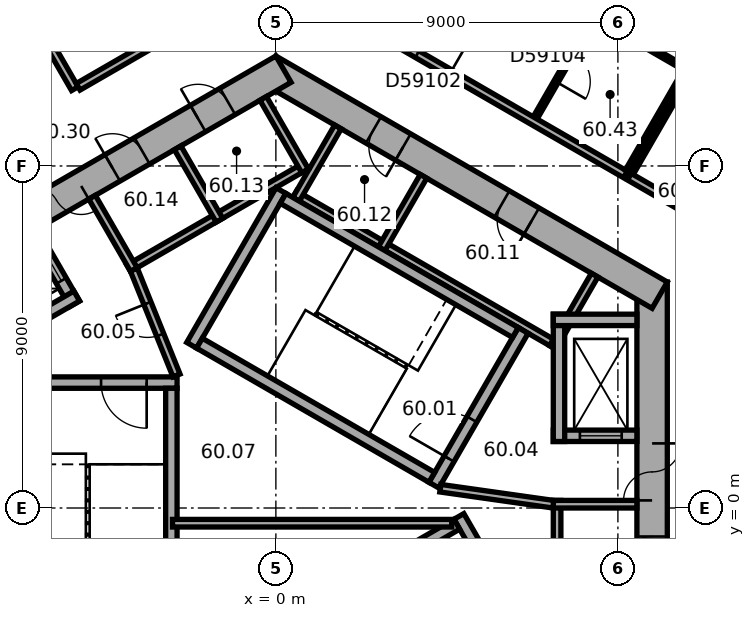
"""IFC4 building model, lengths in metres.
Left out: names, types, materials, properties, quantities, classifications, styles, units other than length and angle.
Written with IfcOpenShell. Run it as: python <this file> out.ifc"""

import sys

from ifc_helpers import new_model, si_unit, direction, frame, frame_2d, origin, place, context, subcontext, project, spatial, rectangle, extrude, element, fill, save


model = new_model("IFC4")
c1 = context("Model", 3, precision=1e-05, world=origin(), true_north=direction((0.0, 1.0)))
c2 = subcontext(c1, "Body", "Model", "MODEL_VIEW")
j1 = project(units=[si_unit("LENGTHUNIT", "METRE"), si_unit("PLANEANGLEUNIT", "RADIAN")], contexts=[c1])
p1 = place(None, origin())
s1 = spatial("IfcSite", under=j1, at=p1, CompositionType="ELEMENT")
p2 = place(p1, origin())
s2 = spatial("IfcBuilding", under=s1, at=p2, CompositionType="ELEMENT")
p3 = place(p2, frame((0.0, 0.0, 243.9)))
s3 = spatial("IfcBuildingStorey", under=s2, at=p3, CompositionType="ELEMENT", Elevation=243.9)
p4 = place(p3, frame((9.9, -5.947, 0.0), z_axis=(0.0, 0.0, 1.0), x_axis=(0.0, 1.0, 0.0)))
e1 = element("IfcWall", 1, at=p4, inside=s3, PredefinedType="SHEAR", context=c2, shape_type="SweptSolid", body=[
    extrude(rectangle(XDim=11.894, YDim=0.8, at=frame_2d((5.947, 0.0))), origin(), (0.0, 0.0, 1.0), 3.7),
])
p5 = place(p4, frame((6.147, 0.0, 0.0)))
e2 = element("IfcOpeningElement", 2, at=p5, cuts=e1, PredefinedType="OPENING", context=c2, shape_type="SweptSolid", body=[
    extrude(rectangle(XDim=1.5, YDim=2.1, at=frame_2d((0.75, 1.05))), frame((0.0, 0.41, 0.0), z_axis=(0.0, -1.0, 0.0), x_axis=(1.0, 0.0, 0.0)), (0.0, 0.0, 1.0), 0.82),
])
p6 = place(p4, frame((1.697, 0.0, 0.0)))
e3 = element("IfcOpeningElement", 3, at=p6, cuts=e1, PredefinedType="OPENING", context=c2, shape_type="SweptSolid", body=[
    extrude(rectangle(XDim=0.9, YDim=2.1, at=frame_2d((0.45, 1.05))), frame((0.0, 0.41, 0.0), z_axis=(0.0, -1.0, 0.0), x_axis=(1.0, 0.0, 0.0)), (0.0, 0.0, 1.0), 0.82),
])
p7 = place(p4, frame((4.297, 0.0, 0.0)))
e4 = element("IfcOpeningElement", 4, at=p7, cuts=e1, PredefinedType="OPENING", context=c2, shape_type="SweptSolid", body=[
    extrude(rectangle(XDim=0.9, YDim=2.1, at=frame_2d((0.45, 1.05))), frame((0.0, 0.41, 0.0), z_axis=(0.0, -1.0, 0.0), x_axis=(1.0, 0.0, 0.0)), (0.0, 0.0, 1.0), 0.82),
])
p8 = place(p3, frame((10.1, 5.6, 0.0), z_axis=(0.0, 0.0, 1.0), x_axis=(-0.866023897231, 0.500002609418, 0.0)))
e5 = element("IfcWall", 5, at=p8, inside=s3, PredefinedType="SHEAR", context=c2, shape_type="SweptSolid", body=[
    extrude(rectangle(XDim=11.894, YDim=0.8, at=frame_2d((5.947, 0.0))), origin(), (0.0, 0.0, 1.0), 3.7),
])
p9 = place(p8, frame((3.897, 0.0, 0.0)))
e6 = element("IfcOpeningElement", 6, at=p9, cuts=e5, PredefinedType="OPENING", context=c2, shape_type="SweptSolid", body=[
    extrude(rectangle(XDim=0.9, YDim=2.1, at=frame_2d((0.45, 1.05))), frame((0.0, 0.41, 0.0), z_axis=(0.0, -1.0, 0.0), x_axis=(1.0, 0.0, 0.0)), (0.0, 0.0, 1.0), 0.82),
])
p10 = place(p8, frame((7.797, 0.0, 0.0)))
e7 = element("IfcOpeningElement", 7, at=p10, cuts=e5, PredefinedType="OPENING", context=c2, shape_type="SweptSolid", body=[
    extrude(rectangle(XDim=0.9, YDim=2.1, at=frame_2d((0.45, 1.05))), frame((0.0, 0.41, 0.0), z_axis=(0.0, -1.0, 0.0), x_axis=(1.0, 0.0, 0.0)), (0.0, 0.0, 1.0), 0.82),
])
p11 = place(p3, frame((0.2, 11.547, 0.0), z_axis=(0.0, 0.0, 1.0), x_axis=(-0.866023897231, -0.500002609418, 0.0)))
e8 = element("IfcWall", 8, at=p11, inside=s3, PredefinedType="SHEAR", context=c2, shape_type="SweptSolid", body=[
    extrude(rectangle(XDim=11.894, YDim=0.8, at=frame_2d((5.947, 0.0))), origin(), (0.0, 0.0, 1.0), 3.7),
])
p12 = place(p11, frame((6.147, 0.0, 0.0)))
e9 = element("IfcOpeningElement", 9, at=p12, cuts=e8, PredefinedType="OPENING", context=c2, shape_type="SweptSolid", body=[
    extrude(rectangle(XDim=1.5, YDim=2.1, at=frame_2d((0.75, 1.05))), frame((0.0, 0.41, 0.0), z_axis=(0.0, -1.0, 0.0), x_axis=(1.0, 0.0, 0.0)), (0.0, 0.0, 1.0), 0.82),
])
p13 = place(p11, frame((1.697, 0.0, 0.0)))
e10 = element("IfcOpeningElement", 10, at=p13, cuts=e8, PredefinedType="OPENING", context=c2, shape_type="SweptSolid", body=[
    extrude(rectangle(XDim=0.9, YDim=2.1, at=frame_2d((0.45, 1.05))), frame((0.0, 0.41, 0.0), z_axis=(0.0, -1.0, 0.0), x_axis=(1.0, 0.0, 0.0)), (0.0, 0.0, 1.0), 0.82),
])
p14 = place(p11, frame((4.297, 0.0, 0.0)))
e11 = element("IfcOpeningElement", 11, at=p14, cuts=e8, PredefinedType="OPENING", context=c2, shape_type="SweptSolid", body=[
    extrude(rectangle(XDim=0.9, YDim=2.1, at=frame_2d((0.45, 1.05))), frame((0.0, 0.41, 0.0), z_axis=(0.0, -1.0, 0.0), x_axis=(1.0, 0.0, 0.0)), (0.0, 0.0, 1.0), 0.82),
])
p15 = place(p3, frame((7.4, -5.2, 0.0), z_axis=(0.0, 0.0, 1.0), x_axis=(0.0, 1.0, 0.0)))
e12 = element("IfcWall", 12, at=p15, inside=s3, PredefinedType="PARTITIONING", context=c2, shape_type="SweptSolid", body=[
    extrude(rectangle(XDim=5.4, YDim=0.2, at=frame_2d((2.7, 0.0))), origin(), (0.0, 0.0, 1.0), 3.42),
])
p16 = place(p3, frame((7.3, 0.1, 0.0), z_axis=(0.0, 0.0, 1.0), x_axis=(1.0, 0.0, 0.0)))
e13 = element("IfcWall", 13, at=p16, inside=s3, PredefinedType="PARTITIONING", context=c2, shape_type="SweptSolid", body=[
    extrude(rectangle(XDim=2.2, YDim=0.2, at=frame_2d((1.1, 0.0))), origin(), (0.0, 0.0, 1.0), 3.42),
])
p17 = place(p3, frame((7.424, 4.259, 0.0), z_axis=(0.0, 0.0, 1.0), x_axis=(-0.866026010844, 0.49999894854, 0.0)))
e14 = element("IfcWall", 14, at=p17, inside=s3, PredefinedType="PARTITIONING", context=c2, shape_type="SweptSolid", body=[
    extrude(rectangle(XDim=8.0, YDim=0.2, at=frame_2d((4.0, 0.0))), origin(), (0.0, 0.0, 1.0), 3.42),
])
for number, where, z_axis, x_axis in (
    (15, (7.287, 4.222, 0.0), (0.0, 0.0, 1.0), (0.5, 0.866, 0.0)),
    (16, (2.784, 6.822, 0.0), (0.0, 0.0, 1.0), (0.5, 0.866, 0.0)),
    (17, (0.532, 8.122, 0.0), (0.0, 0.0, 1.0), (0.5, 0.866, 0.0)),
):
    element("IfcWall", number, at=place(p3, frame(where, z_axis=z_axis, x_axis=x_axis)), inside=s3, PredefinedType="PARTITIONING", context=c2, shape_type="SweptSolid", body=[
        extrude(rectangle(XDim=2.2, YDim=0.2, at=frame_2d((1.1, 0.0))), origin(), (0.0, 0.0, 1.0), 3.42),
    ])
p18 = place(p3, frame((0.803, 9.009, 0.0), z_axis=(0.0, 0.0, 1.0), x_axis=(-0.866028230842, -0.499995103361, 0.0)))
e18 = element("IfcWall", 18, at=p18, inside=s3, PredefinedType="PARTITIONING", context=c2, shape_type="SweptSolid", body=[
    extrude(rectangle(XDim=5.4, YDim=0.2, at=frame_2d((2.7, 0.0))), origin(), (0.0, 0.0, 1.0), 3.42),
])
p19 = place(p3, frame((0.767, 8.872, 0.0), z_axis=(0.0, 0.0, 1.0), x_axis=(-0.499994660107, 0.866028486751, 0.0)))
e19 = element("IfcWall", 19, at=p19, inside=s3, PredefinedType="PARTITIONING", context=c2, shape_type="SweptSolid", body=[
    extrude(rectangle(XDim=2.2, YDim=0.2, at=frame_2d((1.1, 0.0))), origin(), (0.0, 0.0, 1.0), 3.42),
])
for number, where, z_axis, x_axis in (
    (20, (-1.485, 7.572, 0.0), (0.0, 0.0, 1.0), (-0.5, 0.866, 0.0)),
    (21, (-3.737, 6.272, 0.0), (0.0, 0.0, 1.0), (-0.5, 0.866, 0.0)),
):
    element("IfcWall", number, at=place(p3, frame(where, z_axis=z_axis, x_axis=x_axis)), inside=s3, PredefinedType="PARTITIONING", context=c2, shape_type="SweptSolid", body=[
        extrude(rectangle(XDim=2.2, YDim=0.2, at=frame_2d((1.1, 0.0))), origin(), (0.0, 0.0, 1.0), 3.42),
    ])
p20 = place(p3, frame((4.158, 0.602, 0.0), z_axis=(0.0, 0.0, 1.0), x_axis=(0.499977259774, 0.866038532462, 0.0)))
e22 = element("IfcWall", 22, at=p20, inside=s3, PredefinedType="SHEAR", context=c2, shape_type="SweptSolid", body=[
    extrude(rectangle(XDim=4.7, YDim=0.3, at=frame_2d((2.35, 0.0))), origin(), (0.0, 0.0, 1.0), 3.42),
])
p21 = place(p20, frame((0.8, 0.0, 0.0)))
e23 = element("IfcOpeningElement", 23, at=p21, cuts=e22, PredefinedType="OPENING", context=c2, shape_type="SweptSolid", body=[
    extrude(rectangle(XDim=1.2, YDim=2.1, at=frame_2d((0.6, 1.05))), frame((0.0, 0.16, 0.0), z_axis=(0.0, -1.0, 0.0), x_axis=(1.0, 0.0, 0.0)), (0.0, 0.0, 1.0), 0.32),
])
p22 = place(p3, frame((-2.216, 4.282, 0.0), z_axis=(0.0, 0.0, 1.0), x_axis=(0.499977259774, 0.866038532462, 0.0)))
e24 = element("IfcWall", 24, at=p22, inside=s3, PredefinedType="SHEAR", context=c2, shape_type="SweptSolid", body=[
    extrude(rectangle(XDim=4.7, YDim=0.3, at=frame_2d((2.35, 0.0))), origin(), (0.0, 0.0, 1.0), 3.42),
])
for number, where, z_axis, x_axis in (
    (25, (4.103, 0.807, 0.0), (0.0, 0.0, 1.0), (-0.866, 0.5, 0.0)),
    (26, (6.303, 4.617, 0.0), (0.0, 0.0, 1.0), (-0.866, 0.5, 0.0)),
):
    element("IfcWall", number, at=place(p3, frame(where, z_axis=z_axis, x_axis=x_axis)), inside=s3, PredefinedType="SHEAR", context=c2, shape_type="SweptSolid", body=[
        extrude(rectangle(XDim=7.06, YDim=0.3, at=frame_2d((3.53, 0.0))), origin(), (0.0, 0.0, 1.0), 3.42),
    ])
p23 = place(p3, frame((-2.6, 3.3, 0.0), z_axis=(0.0, 0.0, 1.0), x_axis=(-1.0, 0.0, 0.0)))
e27 = element("IfcWall", 27, at=p23, inside=s3, PredefinedType="SHEAR", context=c2, shape_type="SweptSolid", body=[
    extrude(rectangle(XDim=4.7, YDim=0.3, at=frame_2d((2.35, 0.0))), origin(), (0.0, 0.0, 1.0), 3.42),
])
p24 = place(p23, frame((0.8, 0.0, 0.0)))
e28 = element("IfcOpeningElement", 28, at=p24, cuts=e27, PredefinedType="OPENING", context=c2, shape_type="SweptSolid", body=[
    extrude(rectangle(XDim=1.2, YDim=2.1, at=frame_2d((0.6, 1.05))), frame((0.0, 0.16, 0.0), z_axis=(0.0, -1.0, 0.0), x_axis=(1.0, 0.0, 0.0)), (0.0, 0.0, 1.0), 0.32),
])
p25 = place(p3, frame((-2.75, 3.15, 0.0), z_axis=(0.0, 0.0, 1.0), x_axis=(0.0, -1.0, 0.0)))
e29 = element("IfcWall", 29, at=p25, inside=s3, PredefinedType="SHEAR", context=c2, shape_type="SweptSolid", body=[
    extrude(rectangle(XDim=7.06, YDim=0.3, at=frame_2d((3.53, 0.0))), origin(), (0.0, 0.0, 1.0), 3.42),
])
p26 = place(p3, frame((4.816, -0.222, 0.0), z_axis=(0.0, 0.0, 1.0), x_axis=(0.499977259774, -0.866038532462, 0.0)))
e30 = element("IfcWall", 30, at=p26, inside=s3, PredefinedType="SHEAR", context=c2, shape_type="SweptSolid", body=[
    extrude(rectangle(XDim=4.7, YDim=0.3, at=frame_2d((2.35, 0.0))), origin(), (0.0, 0.0, 1.0), 3.42),
])
p27 = place(p3, frame((-1.353, -3.957, 0.0), z_axis=(0.0, 0.0, 1.0), x_axis=(0.866027801685, 0.499995846692, 0.0)))
e31 = element("IfcWall", 31, at=p27, inside=s3, PredefinedType="SHEAR", context=c2, shape_type="SweptSolid", body=[
    extrude(rectangle(XDim=7.06, YDim=0.3, at=frame_2d((3.53, 0.0))), origin(), (0.0, 0.0, 1.0), 3.42),
])
p28 = place(p3, frame((7.3, 1.9, 0.0), z_axis=(0.0, 0.0, 1.0), x_axis=(1.0, 0.0, 0.0)))
e32 = element("IfcWall", 32, at=p28, inside=s3, PredefinedType="SHEAR", context=c2, shape_type="SweptSolid", body=[
    extrude(rectangle(XDim=2.2, YDim=0.3, at=frame_2d((1.1, 0.0))), origin(), (0.0, 0.0, 1.0), 3.42),
])
p29 = place(p28, frame((0.7, 0.0, 0.0)))
e33 = element("IfcOpeningElement", 33, at=p29, cuts=e32, PredefinedType="OPENING", context=c2, shape_type="SweptSolid", body=[
    extrude(rectangle(XDim=1.1, YDim=2.1, at=frame_2d((0.55, 1.05))), frame((0.0, 0.16, 0.0), z_axis=(0.0, -1.0, 0.0), x_axis=(1.0, 0.0, 0.0)), (0.0, 0.0, 1.0), 0.32),
])
p30 = place(p3, frame((7.45, 1.75, 0.0), z_axis=(0.0, 0.0, 1.0), x_axis=(0.0, 1.0, 0.0)))
e34 = element("IfcWall", 34, at=p30, inside=s3, PredefinedType="SHEAR", context=c2, shape_type="SweptSolid", body=[
    extrude(rectangle(XDim=3.35, YDim=0.3, at=frame_2d((1.675, 0.0))), origin(), (0.0, 0.0, 1.0), 3.42),
])
p31 = place(p3, frame((7.3, 4.95, 0.0), z_axis=(0.0, 0.0, 1.0), x_axis=(1.0, 0.0, 0.0)))
e35 = element("IfcWall", 35, at=p31, inside=s3, PredefinedType="SHEAR", context=c2, shape_type="SweptSolid", body=[
    extrude(rectangle(XDim=2.2, YDim=0.3, at=frame_2d((1.1, 0.0))), origin(), (0.0, 0.0, 1.0), 3.42),
])
p32 = place(p3, frame((4.327, 0.521, 0.0), z_axis=(0.0, 0.0, 1.0), x_axis=(0.990124376366, -0.14019172346, 0.0)))
e36 = element("IfcWall", 36, at=p32, inside=s3, PredefinedType="PARTITIONING", context=c2, shape_type="SweptSolid", body=[
    extrude(rectangle(XDim=3.002, YDim=0.2, at=frame_2d((1.501, 0.0))), origin(), (0.0, 0.0, 1.0), 3.42),
])
p33 = place(p3, frame((-5.295, 5.372, 0.0), z_axis=(0.0, 0.0, 1.0), x_axis=(-0.500077893725, 0.86598042715, 0.0)))
e37 = element("IfcWall", 37, at=p33, inside=s3, PredefinedType="SHEAR", context=c2, shape_type="SweptSolid", body=[
    extrude(rectangle(XDim=2.2, YDim=0.3, at=frame_2d((1.1, 0.0))), origin(), (0.0, 0.0, 1.0), 3.42),
])
p34 = place(p33, frame((0.7, 0.0, 0.0)))
e38 = element("IfcOpeningElement", 38, at=p34, cuts=e37, PredefinedType="OPENING", context=c2, shape_type="SweptSolid", body=[
    extrude(rectangle(XDim=1.1, YDim=2.1, at=frame_2d((0.55, 1.05))), frame((0.0, 0.16, 0.0), z_axis=(0.0, -1.0, 0.0), x_axis=(1.0, 0.0, 0.0)), (0.0, 0.0, 1.0), 0.32),
])
p35 = place(p3, frame((-5.24, 5.577, 0.0), z_axis=(0.0, 0.0, 1.0), x_axis=(-0.866014461049, -0.500018952895, 0.0)))
e39 = element("IfcWall", 39, at=p35, inside=s3, PredefinedType="SHEAR", context=c2, shape_type="SweptSolid", body=[
    extrude(rectangle(XDim=3.35, YDim=0.3, at=frame_2d((1.675, 0.0))), origin(), (0.0, 0.0, 1.0), 3.42),
])
p36 = place(p3, frame((-2.615, 3.487, 0.0), z_axis=(0.0, 0.0, 1.0), x_axis=(-0.373576831041, 0.92759924068, 0.0)))
e40 = element("IfcWall", 40, at=p36, inside=s3, PredefinedType="PARTITIONING", context=c2, shape_type="SweptSolid", body=[
    extrude(rectangle(XDim=3.002, YDim=0.2, at=frame_2d((1.501, 0.0))), origin(), (0.0, 0.0, 1.0), 3.42),
])
p37 = place(p36, frame((1.15, 0.0, 0.0)))
e41 = element("IfcOpeningElement", 41, at=p37, cuts=e40, PredefinedType="OPENING", context=c2, shape_type="SweptSolid", body=[
    extrude(rectangle(XDim=0.9, YDim=2.1, at=frame_2d((0.45, 1.05))), frame((0.0, 0.11, 0.0), z_axis=(0.0, -1.0, 0.0), x_axis=(1.0, 0.0, 0.0)), (0.0, 0.0, 1.0), 0.22),
])
p38 = place(p3, frame((-2.72, -0.4, 0.0), z_axis=(0.0, 0.0, 1.0), x_axis=(1.0, 0.0, 0.0)))
e42 = element("IfcWall", 42, at=p38, inside=s3, PredefinedType="PARTITIONING", context=c2, shape_type="SweptSolid", body=[
    extrude(rectangle(XDim=7.347, YDim=0.2, at=frame_2d((3.674, 0.0))), origin(), (0.0, 0.0, 1.0), 3.42),
])
p39 = place(p3, frame((-8.965, 17.399, 0.0), z_axis=(0.0, 0.0, 1.0), x_axis=(0.499993683172, -0.866029050776, 0.0)))
e43 = element("IfcWall", 43, at=p39, inside=s3, PredefinedType="PARTITIONING", context=c2, shape_type="SweptSolid", body=[
    extrude(rectangle(XDim=7.35, YDim=0.2, at=frame_2d((3.675, 0.0))), origin(), (0.0, 0.0, 1.0), 2.87),
])
p40 = place(p39, frame((3.175, 0.0, 0.0)))
e44 = element("IfcOpeningElement", 44, at=p40, cuts=e43, PredefinedType="OPENING", context=c2, shape_type="SweptSolid", body=[
    extrude(rectangle(XDim=1.0, YDim=2.1, at=frame_2d((0.5, 1.05))), frame((0.0, 0.11, 0.0), z_axis=(0.0, -1.0, 0.0), x_axis=(1.0, 0.0, 0.0)), (0.0, 0.0, 1.0), 0.22),
])
p41 = place(p3, frame((-1.167, 13.414, 0.0), z_axis=(0.0, 0.0, 1.0), x_axis=(-0.866023347809, -0.500003561037, 0.0)))
e45 = element("IfcWall", 45, at=p41, inside=s3, PredefinedType="PARTITIONING", context=c2, shape_type="SweptSolid", body=[
    extrude(rectangle(XDim=4.661, YDim=0.2, at=frame_2d((2.331, 0.0))), origin(), (0.0, 0.0, 1.0), 3.42),
])
p42 = place(p3, frame((6.823, 10.264, 0.0), z_axis=(0.0, 0.0, 1.0), x_axis=(0.49999285859, 0.86602952684, 0.0)))
e46 = element("IfcWall", 46, at=p42, inside=s3, PredefinedType="PARTITIONING", context=c2, shape_type="SweptSolid", body=[
    extrude(rectangle(XDim=3.1, YDim=0.12, at=frame_2d((1.55, 0.0))), origin(), (0.0, 0.0, 1.0), 2.87),
])
p43 = place(p42, frame((1.1, 0.0, 0.0)))
e47 = element("IfcOpeningElement", 47, at=p43, cuts=e46, PredefinedType="OPENING", context=c2, shape_type="SweptSolid", body=[
    extrude(rectangle(XDim=0.9, YDim=2.1, at=frame_2d((0.45, 1.05))), frame((0.0, 0.07, 0.0), z_axis=(0.0, -1.0, 0.0), x_axis=(1.0, 0.0, 0.0)), (0.0, 0.0, 1.0), 0.14),
])
p44 = place(p3, frame((8.425, 12.918, 0.0), z_axis=(0.0, 0.0, 1.0), x_axis=(0.866019409031, -0.500010383074, 0.0)))
e48 = element("IfcWall", 48, at=p44, inside=s3, PredefinedType="PARTITIONING", context=c2, shape_type="SweptSolid", body=[
    extrude(rectangle(XDim=2.74, YDim=0.12, at=frame_2d((1.37, 0.0))), origin(), (0.0, 0.0, 1.0), 3.42),
])
p45 = place(p3, frame((9.198, 8.777, 0.0), z_axis=(0.0, 0.0, 1.0), x_axis=(-0.866026106692, 0.499998782526, 0.0)))
e49 = element("IfcWall", 49, at=p45, inside=s3, PredefinedType="PARTITIONING", context=c2, shape_type="SweptSolid", body=[
    extrude(rectangle(XDim=9.483, YDim=0.2, at=frame_2d((4.742, 0.0))), origin(), (0.0, 0.0, 1.0), 3.42),
])
p46 = place(p45, frame((5.325, 0.0, 0.0)))
e50 = element("IfcOpeningElement", 50, at=p46, cuts=e49, PredefinedType="OPENING", context=c2, shape_type="SweptSolid", body=[
    extrude(rectangle(XDim=1.0, YDim=2.1, at=frame_2d((0.5, 1.05))), frame((0.0, 0.11, 0.0), z_axis=(0.0, -1.0, 0.0), x_axis=(1.0, 0.0, 0.0)), (0.0, 0.0, 1.0), 0.22),
])
p47 = place(p3, frame((9.351, 8.804, 0.0), z_axis=(0.0, 0.0, 1.0), x_axis=(0.500031774688, 0.866007057882, 0.0)))
e51 = element("IfcWall", 51, at=p47, inside=s3, PredefinedType="PARTITIONING", context=c2, shape_type="SweptSolid", body=[
    extrude(rectangle(XDim=2.3, YDim=0.12, at=frame_2d((1.15, 0.0))), origin(), (0.0, 0.0, 1.0), 3.42),
])
p48 = place(p3, frame((10.768, 11.496, 0.0), z_axis=(0.0, 0.0, 1.0), x_axis=(-0.500026023896, -0.86601037836, 0.0)))
e52 = element("IfcWall", 52, at=p48, inside=s3, PredefinedType="PARTITIONING", context=c2, shape_type="SweptSolid", body=[
    extrude(rectangle(XDim=3.04, YDim=0.12, at=frame_2d((1.52, 0.0))), origin(), (0.0, 0.0, 1.0), 3.42),
])
p49 = place(p3, frame((11.033, 7.717, 0.0), z_axis=(0.0, 0.0, 1.0), x_axis=(-0.866010750942, 0.50002537861, 0.0)))
e53 = element("IfcWall", 53, at=p49, inside=s3, PredefinedType="PARTITIONING", context=c2, shape_type="SweptSolid", body=[
    extrude(rectangle(XDim=2.0, YDim=0.2, at=frame_2d((1.0, 0.0))), origin(), (0.0, 0.0, 1.0), 3.42),
])
p50 = place(p5, origin())
e54 = element("IfcDoor", 54, at=p50, inside=s3, OperationType="DOUBLE_DOOR_SINGLE_SWING", PredefinedType="DOOR", context=c2, shape_type="SweptSolid", body=[
    extrude(rectangle(XDim=1.5, YDim=2.1, at=frame_2d((0.75, 1.05))), frame((0.0, 0.025, 0.0), z_axis=(0.0, -1.0, 0.0), x_axis=(1.0, 0.0, 0.0)), (0.0, 0.0, 1.0), 0.05),
])
fill(e2, e54)
p51 = place(p12, origin())
e55 = element("IfcDoor", 55, at=p51, inside=s3, OperationType="DOUBLE_DOOR_SINGLE_SWING", PredefinedType="DOOR", context=c2, shape_type="SweptSolid", body=[
    extrude(rectangle(XDim=1.5, YDim=2.1, at=frame_2d((0.75, 1.05))), frame((0.0, 0.025, 0.0), z_axis=(0.0, -1.0, 0.0), x_axis=(1.0, 0.0, 0.0)), (0.0, 0.0, 1.0), 0.05),
])
fill(e9, e55)
p52 = place(p21, origin())
e56 = element("IfcDoor", 56, at=p52, inside=s3, OperationType="SINGLE_SWING_RIGHT", PredefinedType="DOOR", context=c2, shape_type="SweptSolid", body=[
    extrude(rectangle(XDim=1.2, YDim=2.1, at=frame_2d((0.6, 1.05))), frame((0.0, 0.025, 0.0), z_axis=(0.0, -1.0, 0.0), x_axis=(1.0, 0.0, 0.0)), (0.0, 0.0, 1.0), 0.05),
])
fill(e23, e56)
p53 = place(p24, origin())
e57 = element("IfcDoor", 57, at=p53, inside=s3, OperationType="SINGLE_SWING_RIGHT", PredefinedType="DOOR", context=c2, shape_type="SweptSolid", body=[
    extrude(rectangle(XDim=1.2, YDim=2.1, at=frame_2d((0.6, 1.05))), frame((0.0, 0.025, 0.0), z_axis=(0.0, -1.0, 0.0), x_axis=(1.0, 0.0, 0.0)), (0.0, 0.0, 1.0), 0.05),
])
fill(e28, e57)
p54 = place(p37, origin())
e58 = element("IfcDoor", 58, at=p54, inside=s3, OperationType="SINGLE_SWING_LEFT", PredefinedType="DOOR", context=c2, shape_type="SweptSolid", body=[
    extrude(rectangle(XDim=0.9, YDim=2.1, at=frame_2d((0.45, 1.05))), frame((0.0, 0.025, 0.0), z_axis=(0.0, -1.0, 0.0), x_axis=(1.0, 0.0, 0.0)), (0.0, 0.0, 1.0), 0.05),
])
fill(e41, e58)
p55 = place(p7, origin())
e59 = element("IfcDoor", 59, at=p55, inside=s3, OperationType="SINGLE_SWING_LEFT", PredefinedType="DOOR", context=c2, shape_type="SweptSolid", body=[
    extrude(rectangle(XDim=0.9, YDim=2.1, at=frame_2d((0.45, 1.05))), frame((0.0, 0.025, 0.0), z_axis=(0.0, -1.0, 0.0), x_axis=(1.0, 0.0, 0.0)), (0.0, 0.0, 1.0), 0.05),
])
fill(e4, e59)
p56 = place(p9, origin())
e60 = element("IfcDoor", 60, at=p56, inside=s3, OperationType="SINGLE_SWING_LEFT", PredefinedType="DOOR", context=c2, shape_type="SweptSolid", body=[
    extrude(rectangle(XDim=0.9, YDim=2.1, at=frame_2d((0.45, 1.05))), frame((0.0, 0.025, 0.0), z_axis=(0.0, -1.0, 0.0), x_axis=(1.0, 0.0, 0.0)), (0.0, 0.0, 1.0), 0.05),
])
fill(e6, e60)
p57 = place(p10, origin())
e61 = element("IfcDoor", 61, at=p57, inside=s3, OperationType="SINGLE_SWING_LEFT", PredefinedType="DOOR", context=c2, shape_type="SweptSolid", body=[
    extrude(rectangle(XDim=0.9, YDim=2.1, at=frame_2d((0.45, 1.05))), frame((0.0, 0.025, 0.0), z_axis=(0.0, -1.0, 0.0), x_axis=(1.0, 0.0, 0.0)), (0.0, 0.0, 1.0), 0.05),
])
fill(e7, e61)
p58 = place(p13, origin())
e62 = element("IfcDoor", 62, at=p58, inside=s3, OperationType="SINGLE_SWING_LEFT", PredefinedType="DOOR", context=c2, shape_type="SweptSolid", body=[
    extrude(rectangle(XDim=0.9, YDim=2.1, at=frame_2d((0.45, 1.05))), frame((0.0, 0.025, 0.0), z_axis=(0.0, -1.0, 0.0), x_axis=(1.0, 0.0, 0.0)), (0.0, 0.0, 1.0), 0.05),
])
fill(e10, e62)
p59 = place(p14, origin())
e63 = element("IfcDoor", 63, at=p59, inside=s3, OperationType="SINGLE_SWING_LEFT", PredefinedType="DOOR", context=c2, shape_type="SweptSolid", body=[
    extrude(rectangle(XDim=0.9, YDim=2.1, at=frame_2d((0.45, 1.05))), frame((0.0, 0.025, 0.0), z_axis=(0.0, -1.0, 0.0), x_axis=(1.0, 0.0, 0.0)), (0.0, 0.0, 1.0), 0.05),
])
fill(e11, e63)
p60 = place(p29, origin())
e64 = element("IfcDoor", 64, at=p60, inside=s3, OperationType="DOUBLE_DOOR_SLIDING", PredefinedType="DOOR", context=c2, shape_type="SweptSolid", body=[
    extrude(rectangle(XDim=1.1, YDim=2.1, at=frame_2d((0.55, 1.05))), frame((0.0, 0.025, 0.0), z_axis=(0.0, -1.0, 0.0), x_axis=(1.0, 0.0, 0.0)), (0.0, 0.0, 1.0), 0.05),
])
fill(e33, e64)
p61 = place(p34, origin())
e65 = element("IfcDoor", 65, at=p61, inside=s3, OperationType="DOUBLE_DOOR_SLIDING", PredefinedType="DOOR", context=c2, shape_type="SweptSolid", body=[
    extrude(rectangle(XDim=1.1, YDim=2.1, at=frame_2d((0.55, 1.05))), frame((0.0, 0.025, 0.0), z_axis=(0.0, -1.0, 0.0), x_axis=(1.0, 0.0, 0.0)), (0.0, 0.0, 1.0), 0.05),
])
fill(e38, e65)
p62 = place(p46, origin())
e66 = element("IfcDoor", 66, at=p62, inside=s3, OperationType="SINGLE_SWING_LEFT", PredefinedType="DOOR", context=c2, shape_type="SweptSolid", body=[
    extrude(rectangle(XDim=1.0, YDim=2.1, at=frame_2d((0.5, 1.05))), frame((0.0, 0.025, 0.0), z_axis=(0.0, -1.0, 0.0), x_axis=(1.0, 0.0, 0.0)), (0.0, 0.0, 1.0), 0.05),
])
fill(e50, e66)
p63 = place(p43, origin())
e67 = element("IfcDoor", 67, at=p63, inside=s3, OperationType="SINGLE_SWING_LEFT", PredefinedType="DOOR", context=c2, shape_type="SweptSolid", body=[
    extrude(rectangle(XDim=0.9, YDim=2.1, at=frame_2d((0.45, 1.05))), frame((0.0, 0.025, 0.0), z_axis=(0.0, -1.0, 0.0), x_axis=(1.0, 0.0, 0.0)), (0.0, 0.0, 1.0), 0.05),
])
fill(e47, e67)
save(model, sys.argv[1])
